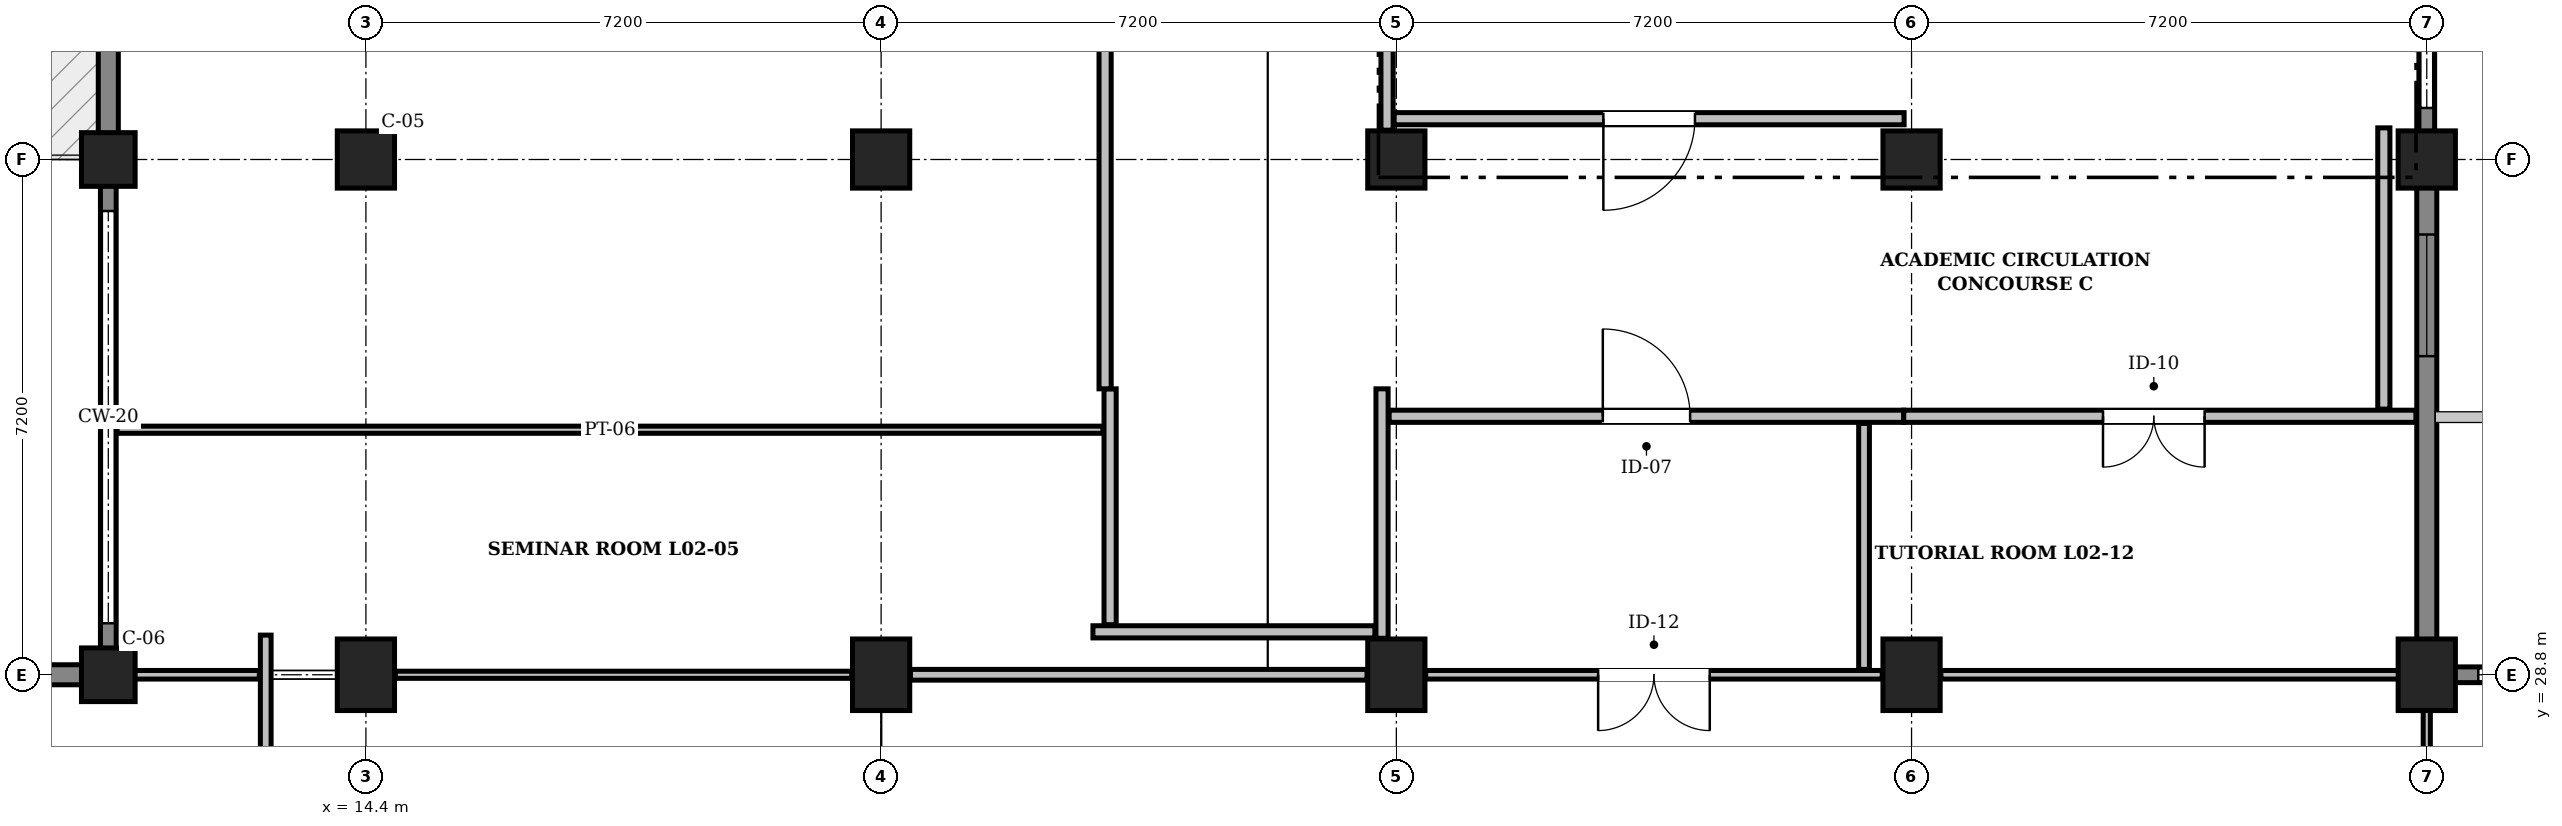
"""IFC4 building model, lengths in metres.
Left out: names, types, materials, properties, quantities, classifications, styles, units other than length and angle.
Written with IfcOpenShell. Run it as: python <this file> out.ifc"""

import sys

from ifc_helpers import new_model, si_unit, direction, frame, frame_2d, origin, origin_2d, place, context, subcontext, project, spatial, rectangle, extrude, element, fill, save


model = new_model("IFC4")
c1 = context("Model", 3, precision=1e-05, world=origin(), true_north=direction((0.0, 1.0)))
c2 = subcontext(c1, "Body", "Model", "MODEL_VIEW")
j1 = project(units=[si_unit("LENGTHUNIT", "METRE"), si_unit("PLANEANGLEUNIT", "RADIAN")], contexts=[c1])
p1 = place(None, origin())
s1 = spatial("IfcSite", under=j1, at=p1, CompositionType="ELEMENT")
p2 = place(p1, origin())
s2 = spatial("IfcBuilding", under=s1, at=p2, CompositionType="ELEMENT")
p3 = place(p2, frame((0.0, 0.0, 9.6)))
s3 = spatial("IfcBuildingStorey", under=s2, at=p3, CompositionType="ELEMENT", Elevation=9.6)
for number, where, z_axis, x_axis in (
    (1, (10.8, 28.8, 0.0), (0.0, 0.0, 1.0), (1.0, 0.0, 0.0)),
    (2, (10.8, 36.0, 0.0), (0.0, 0.0, 1.0), (1.0, 0.0, 0.0)),
):
    element("IfcColumn", number, at=place(p3, frame(where, z_axis=z_axis, x_axis=x_axis)), inside=s3, PredefinedType="COLUMN", context=c2, shape_type="SweptSolid", body=[
        extrude(rectangle(XDim=0.75, YDim=0.75, at=origin_2d()), origin(), (0.0, 0.0, 1.0), 4.8),
    ])
p4 = place(p3, frame((14.4, 28.8, 0.0), z_axis=(0.0, 0.0, 1.0), x_axis=(1.0, 0.0, 0.0)))
e3 = element("IfcColumn", 3, at=p4, inside=s3, PredefinedType="COLUMN", context=c2, shape_type="SweptSolid", body=[
    extrude(rectangle(XDim=0.8, YDim=1.0, at=origin_2d()), origin(), (0.0, 0.0, 1.0), 4.8),
])
p5 = place(p3, frame((14.4, 36.0, 0.0), z_axis=(0.0, 0.0, 1.0), x_axis=(1.0, 0.0, 0.0)))
e4 = element("IfcColumn", 4, at=p5, inside=s3, PredefinedType="COLUMN", context=c2, shape_type="SweptSolid", body=[
    extrude(rectangle(XDim=0.8, YDim=0.8, at=origin_2d()), origin(), (0.0, 0.0, 1.0), 4.8),
])
p6 = place(p3, frame((21.6, 28.8, 0.0), z_axis=(0.0, 0.0, 1.0), x_axis=(1.0, 0.0, 0.0)))
e5 = element("IfcColumn", 5, at=p6, inside=s3, PredefinedType="COLUMN", context=c2, shape_type="SweptSolid", body=[
    extrude(rectangle(XDim=0.8, YDim=1.0, at=origin_2d()), origin(), (0.0, 0.0, 1.0), 4.8),
])
p7 = place(p3, frame((21.6, 36.0, 0.0), z_axis=(0.0, 0.0, 1.0), x_axis=(1.0, 0.0, 0.0)))
e6 = element("IfcColumn", 6, at=p7, inside=s3, PredefinedType="COLUMN", context=c2, shape_type="SweptSolid", body=[
    extrude(rectangle(XDim=0.8, YDim=0.8, at=origin_2d()), origin(), (0.0, 0.0, 1.0), 4.8),
])
p8 = place(p3, frame((28.8, 28.8, 0.0), z_axis=(0.0, 0.0, 1.0), x_axis=(1.0, 0.0, 0.0)))
e7 = element("IfcColumn", 7, at=p8, inside=s3, PredefinedType="COLUMN", context=c2, shape_type="SweptSolid", body=[
    extrude(rectangle(XDim=0.8, YDim=1.0, at=origin_2d()), origin(), (0.0, 0.0, 1.0), 4.8),
])
p9 = place(p3, frame((28.8, 36.0, 0.0), z_axis=(0.0, 0.0, 1.0), x_axis=(1.0, 0.0, 0.0)))
e8 = element("IfcColumn", 8, at=p9, inside=s3, PredefinedType="COLUMN", context=c2, shape_type="SweptSolid", body=[
    extrude(rectangle(XDim=0.8, YDim=0.8, at=origin_2d()), origin(), (0.0, 0.0, 1.0), 4.8),
])
p10 = place(p3, frame((36.0, 28.8, 0.0), z_axis=(0.0, 0.0, 1.0), x_axis=(1.0, 0.0, 0.0)))
e9 = element("IfcColumn", 9, at=p10, inside=s3, PredefinedType="COLUMN", context=c2, shape_type="SweptSolid", body=[
    extrude(rectangle(XDim=0.8, YDim=1.0, at=origin_2d()), origin(), (0.0, 0.0, 1.0), 4.8),
])
p11 = place(p3, frame((36.0, 36.0, 0.0), z_axis=(0.0, 0.0, 1.0), x_axis=(1.0, 0.0, 0.0)))
e10 = element("IfcColumn", 10, at=p11, inside=s3, PredefinedType="COLUMN", context=c2, shape_type="SweptSolid", body=[
    extrude(rectangle(XDim=0.8, YDim=0.8, at=origin_2d()), origin(), (0.0, 0.0, 1.0), 4.8),
])
p12 = place(p3, frame((43.2, 28.8, 0.0), z_axis=(0.0, 0.0, 1.0), x_axis=(1.0, 0.0, 0.0)))
e11 = element("IfcColumn", 11, at=p12, inside=s3, PredefinedType="COLUMN", context=c2, shape_type="SweptSolid", body=[
    extrude(rectangle(XDim=0.8, YDim=1.0, at=origin_2d()), origin(), (0.0, 0.0, 1.0), 4.8),
])
p13 = place(p3, frame((43.2, 36.0, 0.0), z_axis=(0.0, 0.0, 1.0), x_axis=(1.0, 0.0, 0.0)))
e12 = element("IfcColumn", 12, at=p13, inside=s3, PredefinedType="COLUMN", context=c2, shape_type="SweptSolid", body=[
    extrude(rectangle(XDim=0.8, YDim=0.8, at=origin_2d()), origin(), (0.0, 0.0, 1.0), 4.8),
])
p14 = place(p3, frame((10.8, 28.966, 0.0), z_axis=(0.0, 0.0, 1.0), x_axis=(0.0, 1.0, 0.0)))
e13 = element("IfcWall", 13, at=p14, inside=s3, PredefinedType="SOLIDWALL", context=c2, shape_type="SweptSolid", body=[
    extrude(rectangle(XDim=7.034, YDim=0.22, at=frame_2d((3.517, 0.0))), origin(), (0.0, 0.0, 1.0), 1.24),
])
p15 = place(p3, frame((10.8, 36.0, 0.0), z_axis=(0.0, 0.0, 1.0), x_axis=(0.0, 1.0, 0.0)))
e14 = element("IfcWall", 14, at=p15, inside=s3, PredefinedType="SOLIDWALL", context=c2, shape_type="SweptSolid", body=[
    extrude(rectangle(XDim=7.2, YDim=0.28, at=frame_2d((3.6, 0.0))), origin(), (0.0, 0.0, 1.0), 4.52),
])
p16 = place(p15, frame((2.84, 0.0, 0.0)))
e15 = element("IfcOpeningElement", 15, at=p16, cuts=e14, PredefinedType="OPENING", context=c2, shape_type="SweptSolid", body=[
    extrude(rectangle(XDim=1.52, YDim=2.22, at=frame_2d((0.76, 1.11))), frame((0.0, 0.152, 0.0), z_axis=(0.0, -1.0, 0.0), x_axis=(1.0, 0.0, 0.0)), (0.0, 0.0, 1.0), 0.304),
])
p17 = place(p3, frame((7.2, 28.8, 0.0), z_axis=(0.0, 0.0, 1.0), x_axis=(1.0, 0.0, 0.0)))
e16 = element("IfcWall", 16, at=p17, inside=s3, PredefinedType="SOLIDWALL", context=c2, shape_type="SweptSolid", body=[
    extrude(rectangle(XDim=3.75, YDim=0.28, at=frame_2d((1.875, 0.0))), origin(), (0.0, 0.0, 1.0), 4.52),
])
p18 = place(p3, frame((43.05, 28.8, 0.0), z_axis=(0.0, 0.0, 1.0), x_axis=(1.0, 0.0, 0.0)))
e17 = element("IfcWall", 17, at=p18, inside=s3, PredefinedType="SOLIDWALL", context=c2, shape_type="SweptSolid", body=[
    extrude(rectangle(XDim=7.35, YDim=0.22, at=frame_2d((3.675, 0.0))), origin(), (0.0, 0.0, 1.0), 1.24),
])
p19 = place(p3, frame((43.2, 43.2, 0.0), z_axis=(0.0, 0.0, 1.0), x_axis=(0.0, -1.0, 0.0)))
e18 = element("IfcWall", 18, at=p19, inside=s3, PredefinedType="SOLIDWALL", context=c2, shape_type="SweptSolid", body=[
    extrude(rectangle(XDim=7.2, YDim=0.22, at=frame_2d((3.6, 0.0))), origin(), (0.0, 0.0, 1.0), 1.24),
])
p20 = place(p3, frame((43.2, 36.0, 0.0), z_axis=(0.0, 0.0, 1.0), x_axis=(0.0, -1.0, 0.0)))
e19 = element("IfcWall", 19, at=p20, inside=s3, PredefinedType="SOLIDWALL", context=c2, shape_type="SweptSolid", body=[
    extrude(rectangle(XDim=7.034, YDim=0.28, at=frame_2d((3.517, 0.0))), origin(), (0.0, 0.0, 1.0), 4.52),
])
p21 = place(p20, frame((1.048, 0.0, 0.95)))
e20 = element("IfcOpeningElement", 20, at=p21, cuts=e19, PredefinedType="OPENING", context=c2, shape_type="SweptSolid", body=[
    extrude(rectangle(XDim=1.7, YDim=1.8, at=frame_2d((0.85, 0.9))), frame((0.0, 0.152, 0.0), z_axis=(0.0, -1.0, 0.0), x_axis=(1.0, 0.0, 0.0)), (0.0, 0.0, 1.0), 0.304),
])
p22 = place(p3, frame((28.6, 29.31, 0.0), z_axis=(0.0, 0.0, 1.0), x_axis=(0.0, 1.0, 0.0)))
e21 = element("IfcWall", 21, at=p22, inside=s3, PredefinedType="PARTITIONING", context=c2, shape_type="SweptSolid", body=[
    extrude(rectangle(XDim=3.485, YDim=0.17, at=frame_2d((1.743, 0.0))), origin(), (0.0, 0.0, 1.0), 4.03),
])
p23 = place(p3, frame((24.56, 29.4, 0.0), z_axis=(0.0, 0.0, 1.0), x_axis=(1.0, 0.0, 0.0)))
e22 = element("IfcWall", 22, at=p23, inside=s3, PredefinedType="PARTITIONING", context=c2, shape_type="SweptSolid", body=[
    extrude(rectangle(XDim=3.94, YDim=0.17, at=frame_2d((1.97, 0.0))), origin(), (0.0, 0.0, 1.0), 4.46),
])
p24 = place(p3, frame((24.8, 29.5, 0.0), z_axis=(0.0, 0.0, 1.0), x_axis=(0.0, 1.0, 0.0)))
e23 = element("IfcWall", 23, at=p24, inside=s3, PredefinedType="PARTITIONING", context=c2, shape_type="SweptSolid", body=[
    extrude(rectangle(XDim=3.295, YDim=0.17, at=frame_2d((1.648, 0.0))), origin(), (0.0, 0.0, 1.0), 4.46),
])
p25 = place(p3, frame((28.67, 36.41, 0.0), z_axis=(0.0, 0.0, 1.0), x_axis=(0.0, 1.0, 0.0)))
e24 = element("IfcWall", 24, at=p25, inside=s3, PredefinedType="PARTITIONING", context=c2, shape_type="SweptSolid", body=[
    extrude(rectangle(XDim=6.38, YDim=0.17, at=frame_2d((3.19, 0.0))), origin(), (0.0, 0.0, 1.0), 4.03),
])
p26 = place(p3, frame((24.73, 32.795, 0.0), z_axis=(0.0, 0.0, 1.0), x_axis=(0.0, 1.0, 0.0)))
e25 = element("IfcWall", 25, at=p26, inside=s3, PredefinedType="PARTITIONING", context=c2, shape_type="SweptSolid", body=[
    extrude(rectangle(XDim=15.74, YDim=0.17, at=frame_2d((7.87, 0.0))), origin(), (0.0, 0.0, 1.0), 4.46),
])
p27 = place(p26, frame((7.03, 0.0, 0.0)))
e26 = element("IfcOpeningElement", 26, at=p27, cuts=e25, PredefinedType="OPENING", context=c2, shape_type="SweptSolid", body=[
    extrude(rectangle(XDim=1.68, YDim=2.28, at=frame_2d((0.84, 1.14))), frame((0.0, 0.097, 0.0), z_axis=(0.0, -1.0, 0.0), x_axis=(1.0, 0.0, 0.0)), (0.0, 0.0, 1.0), 0.194),
])
p28 = place(p3, frame((28.7, 32.412, 0.0), z_axis=(0.0, 0.0, 1.0), x_axis=(1.0, 0.0, 0.0)))
e27 = element("IfcWall", 27, at=p28, inside=s3, PredefinedType="PARTITIONING", context=c2, shape_type="SweptSolid", body=[
    extrude(rectangle(XDim=7.191, YDim=0.17, at=frame_2d((3.595, 0.0))), origin(), (0.0, 0.0, 1.0), 4.46),
])
p29 = place(p28, frame((2.985, 0.0, 0.0)))
e28 = element("IfcOpeningElement", 28, at=p29, cuts=e27, PredefinedType="OPENING", context=c2, shape_type="SweptSolid", body=[
    extrude(rectangle(XDim=1.22, YDim=2.22, at=frame_2d((0.61, 1.11))), frame((0.0, 0.097, 0.0), z_axis=(0.0, -1.0, 0.0), x_axis=(1.0, 0.0, 0.0)), (0.0, 0.0, 1.0), 0.194),
])
p30 = place(p3, frame((28.77, 36.57, 0.0), z_axis=(0.0, 0.0, 1.0), x_axis=(1.0, 0.0, 0.0)))
e29 = element("IfcWall", 29, at=p30, inside=s3, PredefinedType="PARTITIONING", context=c2, shape_type="SweptSolid", body=[
    extrude(rectangle(XDim=7.126, YDim=0.17, at=frame_2d((3.563, 0.0))), origin(), (0.0, 0.0, 1.0), 4.46),
])
p31 = place(p30, frame((2.923, 0.0, 0.0)))
e30 = element("IfcOpeningElement", 30, at=p31, cuts=e29, PredefinedType="OPENING", context=c2, shape_type="SweptSolid", body=[
    extrude(rectangle(XDim=1.28, YDim=2.22, at=frame_2d((0.64, 1.11))), frame((0.0, 0.097, 0.0), z_axis=(0.0, -1.0, 0.0), x_axis=(1.0, 0.0, 0.0)), (0.0, 0.0, 1.0), 0.194),
])
p32 = place(p3, frame((35.891, 32.412, 0.0), z_axis=(0.0, 0.0, 1.0), x_axis=(1.0, 0.0, 0.0)))
e31 = element("IfcWall", 31, at=p32, inside=s3, PredefinedType="PARTITIONING", context=c2, shape_type="SweptSolid", body=[
    extrude(rectangle(XDim=7.157, YDim=0.17, at=frame_2d((3.579, 0.0))), origin(), (0.0, 0.0, 1.0), 4.46),
])
p33 = place(p32, frame((2.785, 0.0, 0.0)))
e32 = element("IfcOpeningElement", 32, at=p33, cuts=e31, PredefinedType="OPENING", context=c2, shape_type="SweptSolid", body=[
    extrude(rectangle(XDim=1.42, YDim=2.24, at=frame_2d((0.71, 1.12))), frame((0.0, 0.097, 0.0), z_axis=(0.0, -1.0, 0.0), x_axis=(1.0, 0.0, 0.0)), (0.0, 0.0, 1.0), 0.194),
])
p34 = place(p3, frame((42.6, 32.512, 0.0), z_axis=(0.0, 0.0, 1.0), x_axis=(0.0, 1.0, 0.0)))
e33 = element("IfcWall", 33, at=p34, inside=s3, PredefinedType="PARTITIONING", context=c2, shape_type="SweptSolid", body=[
    extrude(rectangle(XDim=3.93, YDim=0.17, at=frame_2d((1.965, 0.0))), origin(), (0.0, 0.0, 1.0), 4.46),
])
p35 = place(p3, frame((13.0, 23.63, 0.0), z_axis=(0.0, 0.0, 1.0), x_axis=(0.0, 1.0, 0.0)))
e34 = element("IfcWall", 34, at=p35, inside=s3, PredefinedType="PARTITIONING", context=c2, shape_type="SweptSolid", body=[
    extrude(rectangle(XDim=5.724, YDim=0.15, at=frame_2d((2.862, 0.0))), origin(), (0.0, 0.0, 1.0), 4.46),
])
p36 = place(p3, frame((29.21, 28.8, 0.0), z_axis=(0.0, 0.0, 1.0), x_axis=(1.0, 0.0, 0.0)))
e35 = element("IfcWall", 35, at=p36, inside=s3, PredefinedType="PARTITIONING", context=c2, shape_type="SweptSolid", body=[
    extrude(rectangle(XDim=6.38, YDim=0.12, at=frame_2d((3.19, 0.0))), origin(), (0.0, 0.0, 1.0), 3.93),
])
p37 = place(p36, frame((2.41, 0.0, 0.0)))
e36 = element("IfcOpeningElement", 36, at=p37, cuts=e35, PredefinedType="OPENING", context=c2, shape_type="SweptSolid", body=[
    extrude(rectangle(XDim=1.56, YDim=2.26, at=frame_2d((0.78, 1.13))), frame((0.0, 0.072, 0.0), z_axis=(0.0, -1.0, 0.0), x_axis=(1.0, 0.0, 0.0)), (0.0, 0.0, 1.0), 0.144),
])
p38 = place(p3, frame((14.81, 28.8, 0.0), z_axis=(0.0, 0.0, 1.0), x_axis=(1.0, 0.0, 0.0)))
e37 = element("IfcWall", 37, at=p38, inside=s3, PredefinedType="PARTITIONING", context=c2, shape_type="SweptSolid", body=[
    extrude(rectangle(XDim=6.38, YDim=0.1, at=frame_2d((3.19, 0.0))), origin(), (0.0, 0.0, 1.0), 3.93),
])
p39 = place(p3, frame((22.01, 28.8, 0.0), z_axis=(0.0, 0.0, 1.0), x_axis=(1.0, 0.0, 0.0)))
e38 = element("IfcWall", 38, at=p39, inside=s3, PredefinedType="PARTITIONING", context=c2, shape_type="SweptSolid", body=[
    extrude(rectangle(XDim=6.38, YDim=0.15, at=frame_2d((3.19, 0.0))), origin(), (0.0, 0.0, 1.0), 3.93),
])
p40 = place(p3, frame((36.41, 28.8, 0.0), z_axis=(0.0, 0.0, 1.0), x_axis=(1.0, 0.0, 0.0)))
e39 = element("IfcWall", 39, at=p40, inside=s3, PredefinedType="PARTITIONING", context=c2, shape_type="SweptSolid", body=[
    extrude(rectangle(XDim=6.628, YDim=0.12, at=frame_2d((3.314, 0.0))), origin(), (0.0, 0.0, 1.0), 3.93),
])
p41 = place(p3, frame((43.2, 22.11, 0.0), z_axis=(0.0, 0.0, 1.0), x_axis=(0.0, 1.0, 0.0)))
e40 = element("IfcWall", 40, at=p41, inside=s3, PredefinedType="PARTITIONING", context=c2, shape_type="SweptSolid", body=[
    extrude(rectangle(XDim=6.568, YDim=0.1, at=frame_2d((3.284, 0.0))), origin(), (0.0, 0.0, 1.0), 4.03),
])
p42 = place(p3, frame((10.962, 28.8, 0.0), z_axis=(0.0, 0.0, 1.0), x_axis=(1.0, 0.0, 0.0)))
e41 = element("IfcWall", 41, at=p42, inside=s3, PredefinedType="PARTITIONING", context=c2, shape_type="SweptSolid", body=[
    extrude(rectangle(XDim=1.948, YDim=0.12, at=frame_2d((0.974, 0.0))), origin(), (0.0, 0.0, 1.0), 3.93),
])
p43 = place(p3, frame((10.922, 32.224, 0.0), z_axis=(0.0, 0.0, 1.0), x_axis=(1.0, 0.0, 0.0)))
e42 = element("IfcWall", 42, at=p43, inside=s3, PredefinedType="PARTITIONING", context=c2, shape_type="SweptSolid", body=[
    extrude(rectangle(XDim=13.778, YDim=0.1, at=frame_2d((6.889, 0.0))), origin(), (0.0, 0.0, 1.0), 4.46),
])
p44 = place(p3, frame((35.336, 28.875, 0.0), z_axis=(0.0, 0.0, 1.0), x_axis=(0.0, 1.0, 0.0)))
e43 = element("IfcWall", 43, at=p44, inside=s3, PredefinedType="PARTITIONING", context=c2, shape_type="SweptSolid", body=[
    extrude(rectangle(XDim=3.437, YDim=0.15, at=frame_2d((1.719, 0.0))), origin(), (0.0, 0.0, 1.0), 4.46),
])
p45 = place(p21, origin())
e44 = element("IfcWindow", 44, at=p45, inside=s3, PartitioningType="SINGLE_PANEL", PredefinedType="WINDOW", context=c2, shape_type="SweptSolid", body=[
    extrude(rectangle(XDim=1.7, YDim=1.8, at=frame_2d((0.85, 0.9))), frame((0.0, 0.03, 0.0), z_axis=(0.0, -1.0, 0.0), x_axis=(1.0, 0.0, 0.0)), (0.0, 0.0, 1.0), 0.06),
])
fill(e20, e44)
p46 = place(p29, origin())
e45 = element("IfcDoor", 45, at=p46, inside=s3, OperationType="SINGLE_SWING_LEFT", PredefinedType="DOOR", context=c2, shape_type="SweptSolid", body=[
    extrude(rectangle(XDim=1.22, YDim=2.22, at=frame_2d((0.61, 1.11))), frame((0.0, 0.025, 0.0), z_axis=(0.0, -1.0, 0.0), x_axis=(1.0, 0.0, 0.0)), (0.0, 0.0, 1.0), 0.05),
])
fill(e28, e45)
p47 = place(p31, frame((1.28, 0.0, 0.0), z_axis=(0.0, 0.0, 1.0), x_axis=(-1.0, 0.0, 0.0)))
e46 = element("IfcDoor", 46, at=p47, inside=s3, OperationType="SINGLE_SWING_RIGHT", PredefinedType="DOOR", context=c2, shape_type="SweptSolid", body=[
    extrude(rectangle(XDim=1.28, YDim=2.22, at=frame_2d((0.64, 1.11))), frame((0.0, 0.025, 0.0), z_axis=(0.0, -1.0, 0.0), x_axis=(1.0, 0.0, 0.0)), (0.0, 0.0, 1.0), 0.05),
])
fill(e30, e46)
p48 = place(p33, frame((1.42, 0.0, 0.0), z_axis=(0.0, 0.0, 1.0), x_axis=(-1.0, 0.0, 0.0)))
e47 = element("IfcDoor", 47, at=p48, inside=s3, OperationType="DOUBLE_DOOR_SINGLE_SWING", PredefinedType="DOOR", context=c2, shape_type="SweptSolid", body=[
    extrude(rectangle(XDim=1.42, YDim=2.24, at=frame_2d((0.71, 1.12))), frame((0.0, 0.025, 0.0), z_axis=(0.0, -1.0, 0.0), x_axis=(1.0, 0.0, 0.0)), (0.0, 0.0, 1.0), 0.05),
])
fill(e32, e47)
p49 = place(p37, frame((1.56, 0.0, 0.0), z_axis=(0.0, 0.0, 1.0), x_axis=(-1.0, 0.0, 0.0)))
e48 = element("IfcDoor", 48, at=p49, inside=s3, OperationType="DOUBLE_DOOR_SINGLE_SWING", PredefinedType="DOOR", context=c2, shape_type="SweptSolid", body=[
    extrude(rectangle(XDim=1.56, YDim=2.26, at=frame_2d((0.78, 1.13))), frame((0.0, 0.025, 0.0), z_axis=(0.0, -1.0, 0.0), x_axis=(1.0, 0.0, 0.0)), (0.0, 0.0, 1.0), 0.05),
])
fill(e36, e48)
save(model, sys.argv[1])
